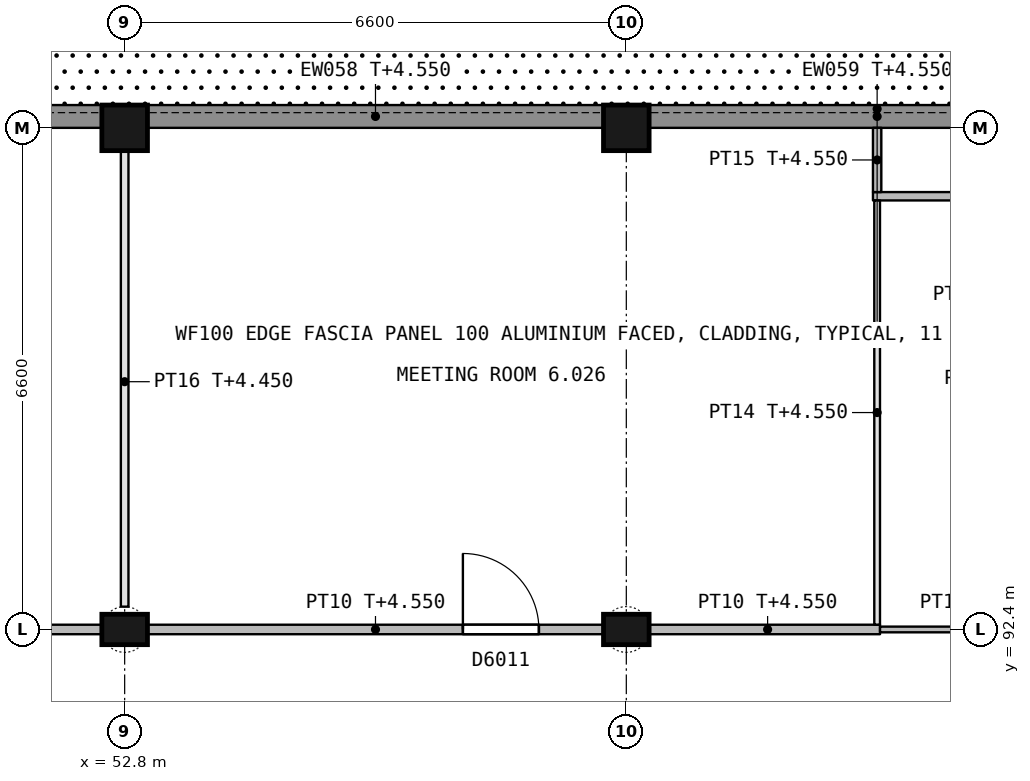
"""IFC4 building model, lengths in metres.
Left out: names, types, materials, properties, quantities, classifications, styles, units other than length and angle.
Written with IfcOpenShell. Run it as: python <this file> out.ifc"""

import sys

from ifc_helpers import new_model, si_unit, direction, frame, frame_2d, origin, origin_2d, place, context, subcontext, project, spatial, rectangle, extrude, element, fill, save


model = new_model("IFC4")
c1 = context("Model", 3, precision=1e-05, world=origin(), true_north=direction((0.0, 1.0)))
c2 = subcontext(c1, "Body", "Model", "MODEL_VIEW")
j1 = project(units=[si_unit("LENGTHUNIT", "METRE"), si_unit("PLANEANGLEUNIT", "RADIAN")], contexts=[c1])
p1 = place(None, origin())
s1 = spatial("IfcSite", under=j1, at=p1, CompositionType="ELEMENT")
p2 = place(p1, origin())
s2 = spatial("IfcBuilding", under=s1, at=p2, CompositionType="ELEMENT")
p3 = place(p2, origin())
s3 = spatial("IfcBuildingStorey", under=s2, at=p3, CompositionType="ELEMENT", Elevation=0.0)
p4 = place(p3, frame((52.8, 92.4, 0.0), z_axis=(0.0, 0.0, 1.0), x_axis=(1.0, 0.0, 0.0)))
e1 = element("IfcColumn", 1, at=p4, inside=s3, PredefinedType="COLUMN", context=c2, shape_type="SweptSolid", body=[
    extrude(rectangle(XDim=0.6, YDim=0.4, at=origin_2d()), origin(), (0.0, 0.0, 1.0), 5.4),
])
p5 = place(p3, frame((52.8, 99.0, 0.0), z_axis=(0.0, 0.0, 1.0), x_axis=(1.0, 0.0, 0.0)))
e2 = element("IfcColumn", 2, at=p5, inside=s3, PredefinedType="COLUMN", context=c2, shape_type="SweptSolid", body=[
    extrude(rectangle(XDim=0.6, YDim=0.6, at=origin_2d()), origin(), (0.0, 0.0, 1.0), 5.4),
])
p6 = place(p3, frame((59.4, 92.4, 0.0), z_axis=(0.0, 0.0, 1.0), x_axis=(1.0, 0.0, 0.0)))
e3 = element("IfcColumn", 3, at=p6, inside=s3, PredefinedType="COLUMN", context=c2, shape_type="SweptSolid", body=[
    extrude(rectangle(XDim=0.6, YDim=0.4, at=origin_2d()), origin(), (0.0, 0.0, 1.0), 5.4),
])
p7 = place(p3, frame((59.4, 99.0, 0.0), z_axis=(0.0, 0.0, 1.0), x_axis=(1.0, 0.0, 0.0)))
e4 = element("IfcColumn", 4, at=p7, inside=s3, PredefinedType="COLUMN", context=c2, shape_type="SweptSolid", body=[
    extrude(rectangle(XDim=0.6, YDim=0.6, at=origin_2d()), origin(), (0.0, 0.0, 1.0), 5.4),
])
for number, where, z_axis, x_axis in (
    (5, (46.5, 99.15, 0.0), (0.0, 0.0, 1.0), (1.0, 0.0, 0.0)),
    (6, (53.1, 99.15, 0.0), (0.0, 0.0, 1.0), (1.0, 0.0, 0.0)),
    (7, (59.7, 99.15, 0.0), (0.0, 0.0, 1.0), (1.0, 0.0, 0.0)),
):
    element("IfcWall", number, at=place(p3, frame(where, z_axis=z_axis, x_axis=x_axis)), inside=s3, PredefinedType="STANDARD", context=c2, shape_type="SweptSolid", body=[
        extrude(rectangle(XDim=6.0, YDim=0.3, at=frame_2d((3.0, 0.0))), origin(), (0.0, 0.0, 1.0), 4.55),
    ])
p8 = place(p3, frame((46.5, 92.4, 0.0), z_axis=(0.0, 0.0, 1.0), x_axis=(1.0, 0.0, 0.0)))
e8 = element("IfcWall", 8, at=p8, inside=s3, PredefinedType="PARTITIONING", context=c2, shape_type="SweptSolid", body=[
    extrude(rectangle(XDim=6.0, YDim=0.125, at=frame_2d((3.0, 0.0))), origin(), (0.0, 0.0, 1.0), 4.55),
])
p9 = place(p3, frame((53.1, 92.4, 0.0), z_axis=(0.0, 0.0, 1.0), x_axis=(1.0, 0.0, 0.0)))
e9 = element("IfcWall", 9, at=p9, inside=s3, PredefinedType="PARTITIONING", context=c2, shape_type="SweptSolid", body=[
    extrude(rectangle(XDim=6.0, YDim=0.125, at=frame_2d((3.0, 0.0))), origin(), (0.0, 0.0, 1.0), 4.55),
])
p10 = place(p9, frame((4.15, 0.0, 0.0)))
e10 = element("IfcOpeningElement", 10, at=p10, cuts=e9, PredefinedType="OPENING", context=c2, shape_type="SweptSolid", body=[
    extrude(rectangle(XDim=1.0, YDim=2.1, at=frame_2d((0.5, 1.05))), frame((0.0, 0.073, 0.0), z_axis=(0.0, -1.0, 0.0), x_axis=(1.0, 0.0, 0.0)), (0.0, 0.0, 1.0), 0.145),
])
p11 = place(p3, frame((59.7, 92.4, 0.0), z_axis=(0.0, 0.0, 1.0), x_axis=(1.0, 0.0, 0.0)))
e11 = element("IfcWall", 11, at=p11, inside=s3, PredefinedType="PARTITIONING", context=c2, shape_type="SweptSolid", body=[
    extrude(rectangle(XDim=3.038, YDim=0.125, at=frame_2d((1.519, 0.0))), origin(), (0.0, 0.0, 1.0), 4.55),
])
p12 = place(p3, frame((62.738, 92.4, 0.0), z_axis=(0.0, 0.0, 1.0), x_axis=(1.0, 0.0, 0.0)))
e12 = element("IfcWall", 12, at=p12, inside=s3, PredefinedType="PARTITIONING", context=c2, shape_type="SweptSolid", body=[
    extrude(rectangle(XDim=2.962, YDim=0.075, at=frame_2d((1.481, 0.0))), origin(), (0.0, 0.0, 1.0), 4.55),
])
p13 = place(p3, frame((66.055, 98.1, 0.0), z_axis=(0.0, 0.0, 1.0), x_axis=(-1.0, 0.0, 0.0)))
e13 = element("IfcWall", 13, at=p13, inside=s3, PredefinedType="PARTITIONING", context=c2, shape_type="SweptSolid", body=[
    extrude(rectangle(XDim=3.41, YDim=0.11, at=frame_2d((1.705, 0.0))), origin(), (0.0, 0.0, 1.0), 4.45),
])
p14 = place(p13, frame((1.405, 0.0, 0.0)))
e14 = element("IfcOpeningElement", 14, at=p14, cuts=e13, PredefinedType="OPENING", context=c2, shape_type="SweptSolid", body=[
    extrude(rectangle(XDim=0.6, YDim=2.1, at=frame_2d((0.3, 1.05))), frame((0.0, 0.065, 0.0), z_axis=(0.0, -1.0, 0.0), x_axis=(1.0, 0.0, 0.0)), (0.0, 0.0, 1.0), 0.13),
])
p15 = place(p3, frame((52.8, 92.7, 0.0), z_axis=(0.0, 0.0, 1.0), x_axis=(0.0, 1.0, 0.0)))
e15 = element("IfcWall", 15, at=p15, inside=s3, PredefinedType="PARTITIONING", context=c2, shape_type="SweptSolid", body=[
    extrude(rectangle(XDim=6.0, YDim=0.1, at=frame_2d((3.0, 0.0))), origin(), (0.0, 0.0, 1.0), 4.45),
])
p16 = place(p3, frame((62.7, 92.463, 0.0), z_axis=(0.0, 0.0, 1.0), x_axis=(0.0, 1.0, 0.0)))
e16 = element("IfcWall", 16, at=p16, inside=s3, PredefinedType="PARTITIONING", context=c2, shape_type="SweptSolid", body=[
    extrude(rectangle(XDim=5.582, YDim=0.075, at=frame_2d((2.791, 0.0))), origin(), (0.0, 0.0, 1.0), 4.55),
])
p17 = place(p3, frame((62.7, 98.155, 0.0), z_axis=(0.0, 0.0, 1.0), x_axis=(0.0, 1.0, 0.0)))
e17 = element("IfcWall", 17, at=p17, inside=s3, PredefinedType="PARTITIONING", context=c2, shape_type="SweptSolid", body=[
    extrude(rectangle(XDim=0.845, YDim=0.11, at=frame_2d((0.422, 0.0))), origin(), (0.0, 0.0, 1.0), 4.55),
])
p18 = place(p10, origin())
e18 = element("IfcDoor", 18, at=p18, inside=s3, OperationType="SINGLE_SWING_LEFT", PredefinedType="DOOR", context=c2, shape_type="SweptSolid", body=[
    extrude(rectangle(XDim=1.0, YDim=2.1, at=frame_2d((0.5, 1.05))), frame((0.0, 0.025, 0.0), z_axis=(0.0, -1.0, 0.0), x_axis=(1.0, 0.0, 0.0)), (0.0, 0.0, 1.0), 0.05),
])
fill(e10, e18)
save(model, sys.argv[1])
